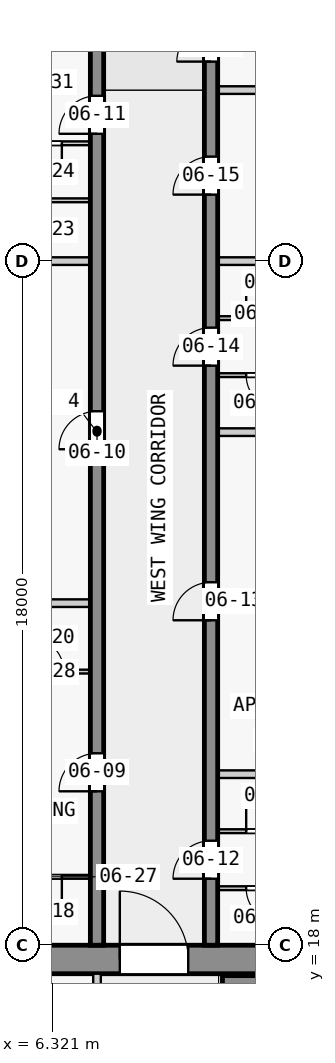
"""IFC4 building model, lengths in metres.
Left out: names, types, materials, properties, quantities, classifications, styles, units other than length and angle.
Written with IfcOpenShell. Run it as: python <this file> out.ifc"""

import sys

from ifc_helpers import new_model, si_unit, direction, frame, frame_2d, origin, place, context, subcontext, project, spatial, rectangle, extrude, element, fill, save


model = new_model("IFC4")
c1 = context("Model", 3, precision=1e-05, world=origin(), true_north=direction((0.0, 1.0)))
c2 = subcontext(c1, "Body", "Model", "MODEL_VIEW")
j1 = project(units=[si_unit("LENGTHUNIT", "METRE"), si_unit("PLANEANGLEUNIT", "RADIAN")], contexts=[c1])
p1 = place(None, origin())
s1 = spatial("IfcSite", under=j1, at=p1, CompositionType="ELEMENT")
p2 = place(p1, origin())
s2 = spatial("IfcBuilding", under=s1, at=p2, CompositionType="ELEMENT")
p3 = place(p2, frame((0.0, 0.0, 30.3)))
s3 = spatial("IfcBuildingStorey", under=s2, at=p3, CompositionType="ELEMENT", Elevation=30.3)
p4 = place(p3, frame((1.55, 17.625, 0.0), z_axis=(0.0, 0.0, 1.0), x_axis=(1.0, 0.0, 0.0)))
e1 = element("IfcWall", 1, at=p4, inside=s3, PredefinedType="SHEAR", context=c2, shape_type="SweptSolid", body=[
    extrude(rectangle(XDim=20.95, YDim=0.75, at=frame_2d((10.475, 0.0))), origin(), (0.0, 0.0, 1.0), 3.25),
])
p5 = place(p4, frame((6.55, 0.0, 0.0)))
e2 = element("IfcOpeningElement", 2, at=p5, cuts=e1, PredefinedType="OPENING", context=c2, shape_type="SweptSolid", body=[
    extrude(rectangle(XDim=1.8, YDim=2.1, at=frame_2d((0.9, 1.05))), frame((0.0, 0.385, 0.0), z_axis=(0.0, -1.0, 0.0), x_axis=(1.0, 0.0, 0.0)), (0.0, 0.0, 1.0), 0.77),
])
p6 = place(p3, frame((10.8, 17.05, 0.0), z_axis=(0.0, 0.0, 1.0), x_axis=(1.0, 0.0, 0.0)))
e3 = element("IfcWall", 3, at=p6, inside=s3, PredefinedType="SHEAR", context=c2, shape_type="SweptSolid", body=[
    extrude(rectangle(XDim=7.8, YDim=0.3, at=frame_2d((3.9, 0.0))), origin(), (0.0, 0.0, 1.0), 3.25),
])
p7 = place(p3, frame((7.5, 18.0, 0.0), z_axis=(0.0, 0.0, 1.0), x_axis=(0.0, 1.0, 0.0)))
e4 = element("IfcWall", 4, at=p7, inside=s3, PredefinedType="SHEAR", context=c2, shape_type="SweptSolid", body=[
    extrude(rectangle(XDim=27.0, YDim=0.35, at=frame_2d((13.5, 0.0))), origin(), (0.0, 0.0, 1.0), 3.25),
])
p8 = place(p7, frame((4.05, 0.0, 0.0)))
e5 = element("IfcOpeningElement", 5, at=p8, cuts=e4, PredefinedType="OPENING", context=c2, shape_type="SweptSolid", body=[
    extrude(rectangle(XDim=1.0, YDim=2.1, at=frame_2d((0.5, 1.05))), frame((0.0, 0.185, 0.0), z_axis=(0.0, -1.0, 0.0), x_axis=(1.0, 0.0, 0.0)), (0.0, 0.0, 1.0), 0.37),
])
p9 = place(p7, frame((13.05, 0.0, 0.0)))
e6 = element("IfcOpeningElement", 6, at=p9, cuts=e4, PredefinedType="OPENING", context=c2, shape_type="SweptSolid", body=[
    extrude(rectangle(XDim=1.0, YDim=2.1, at=frame_2d((0.5, 1.05))), frame((0.0, 0.185, 0.0), z_axis=(0.0, -1.0, 0.0), x_axis=(1.0, 0.0, 0.0)), (0.0, 0.0, 1.0), 0.37),
])
p10 = place(p7, frame((21.35, 0.0, 0.0)))
e7 = element("IfcOpeningElement", 7, at=p10, cuts=e4, PredefinedType="OPENING", context=c2, shape_type="SweptSolid", body=[
    extrude(rectangle(XDim=1.0, YDim=2.1, at=frame_2d((0.5, 1.05))), frame((0.0, 0.185, 0.0), z_axis=(0.0, -1.0, 0.0), x_axis=(1.0, 0.0, 0.0)), (0.0, 0.0, 1.0), 0.37),
])
p11 = place(p3, frame((10.5, 18.0, 0.0), z_axis=(0.0, 0.0, 1.0), x_axis=(0.0, 1.0, 0.0)))
e8 = element("IfcWall", 8, at=p11, inside=s3, PredefinedType="SHEAR", context=c2, shape_type="SweptSolid", body=[
    extrude(rectangle(XDim=27.0, YDim=0.35, at=frame_2d((13.5, 0.0))), origin(), (0.0, 0.0, 1.0), 3.25),
])
p12 = place(p11, frame((1.75, 0.0, 0.0)))
e9 = element("IfcOpeningElement", 9, at=p12, cuts=e8, PredefinedType="OPENING", context=c2, shape_type="SweptSolid", body=[
    extrude(rectangle(XDim=1.0, YDim=2.1, at=frame_2d((0.5, 1.05))), frame((0.0, 0.185, 0.0), z_axis=(0.0, -1.0, 0.0), x_axis=(1.0, 0.0, 0.0)), (0.0, 0.0, 1.0), 0.37),
])
p13 = place(p11, frame((8.55, 0.0, 0.0)))
e10 = element("IfcOpeningElement", 10, at=p13, cuts=e8, PredefinedType="OPENING", context=c2, shape_type="SweptSolid", body=[
    extrude(rectangle(XDim=1.0, YDim=2.1, at=frame_2d((0.5, 1.05))), frame((0.0, 0.185, 0.0), z_axis=(0.0, -1.0, 0.0), x_axis=(1.0, 0.0, 0.0)), (0.0, 0.0, 1.0), 0.37),
])
p14 = place(p11, frame((15.25, 0.0, 0.0)))
e11 = element("IfcOpeningElement", 11, at=p14, cuts=e8, PredefinedType="OPENING", context=c2, shape_type="SweptSolid", body=[
    extrude(rectangle(XDim=1.0, YDim=2.1, at=frame_2d((0.5, 1.05))), frame((0.0, 0.185, 0.0), z_axis=(0.0, -1.0, 0.0), x_axis=(1.0, 0.0, 0.0)), (0.0, 0.0, 1.0), 0.37),
])
p15 = place(p11, frame((19.75, 0.0, 0.0)))
e12 = element("IfcOpeningElement", 12, at=p15, cuts=e8, PredefinedType="OPENING", context=c2, shape_type="SweptSolid", body=[
    extrude(rectangle(XDim=1.0, YDim=2.1, at=frame_2d((0.5, 1.05))), frame((0.0, 0.185, 0.0), z_axis=(0.0, -1.0, 0.0), x_axis=(1.0, 0.0, 0.0)), (0.0, 0.0, 1.0), 0.37),
])
p16 = place(p11, frame((23.25, 0.0, 0.0)))
e13 = element("IfcOpeningElement", 13, at=p16, cuts=e8, PredefinedType="OPENING", context=c2, shape_type="SweptSolid", body=[
    extrude(rectangle(XDim=0.9, YDim=2.1, at=frame_2d((0.45, 1.05))), frame((0.0, 0.185, 0.0), z_axis=(0.0, -1.0, 0.0), x_axis=(1.0, 0.0, 0.0)), (0.0, 0.0, 1.0), 0.37),
])
p17 = place(p11, frame((25.45, 0.0, 0.0)))
e14 = element("IfcOpeningElement", 14, at=p17, cuts=e8, PredefinedType="OPENING", context=c2, shape_type="SweptSolid", body=[
    extrude(rectangle(XDim=1.0, YDim=2.1, at=frame_2d((0.5, 1.05))), frame((0.0, 0.185, 0.0), z_axis=(0.0, -1.0, 0.0), x_axis=(1.0, 0.0, 0.0)), (0.0, 0.0, 1.0), 0.37),
])
p18 = place(p3, frame((7.5, 10.1, 0.0), z_axis=(0.0, 0.0, 1.0), x_axis=(0.0, 1.0, 0.0)))
e15 = element("IfcWall", 15, at=p18, inside=s3, PredefinedType="PARTITIONING", context=c2, shape_type="SweptSolid", body=[
    extrude(rectangle(XDim=7.15, YDim=0.2, at=frame_2d((3.575, 0.0))), origin(), (0.0, 0.0, 1.0), 3.25),
])
p19 = place(p18, frame((1.05, 0.0, 0.0)))
e16 = element("IfcOpeningElement", 16, at=p19, cuts=e15, PredefinedType="OPENING", context=c2, shape_type="SweptSolid", body=[
    extrude(rectangle(XDim=0.9, YDim=2.1, at=frame_2d((0.45, 1.05))), frame((0.0, 0.11, 0.0), z_axis=(0.0, -1.0, 0.0), x_axis=(1.0, 0.0, 0.0)), (0.0, 0.0, 1.0), 0.22),
])
p20 = place(p18, frame((4.625, 0.0, 0.0)))
e17 = element("IfcOpeningElement", 17, at=p20, cuts=e15, PredefinedType="OPENING", context=c2, shape_type="SweptSolid", body=[
    extrude(rectangle(XDim=0.9, YDim=2.1, at=frame_2d((0.45, 1.05))), frame((0.0, 0.11, 0.0), z_axis=(0.0, -1.0, 0.0), x_axis=(1.0, 0.0, 0.0)), (0.0, 0.0, 1.0), 0.22),
])
p21 = place(p3, frame((13.075, 19.5, 0.0), z_axis=(0.0, 0.0, 1.0), x_axis=(-1.0, 0.0, 0.0)))
e18 = element("IfcWall", 18, at=p21, inside=s3, PredefinedType="PARTITIONING", context=c2, shape_type="SweptSolid", body=[
    extrude(rectangle(XDim=2.4, YDim=0.1, at=frame_2d((1.2, 0.0))), origin(), (0.0, 0.0, 1.0), 3.25),
])
p22 = place(p21, frame((0.75, 0.0, 0.0)))
e19 = element("IfcOpeningElement", 19, at=p22, cuts=e18, PredefinedType="OPENING", context=c2, shape_type="SweptSolid", body=[
    extrude(rectangle(XDim=0.9, YDim=2.1, at=frame_2d((0.45, 1.05))), frame((0.0, 0.06, 0.0), z_axis=(0.0, -1.0, 0.0), x_axis=(1.0, 0.0, 0.0)), (0.0, 0.0, 1.0), 0.12),
])
p23 = place(p3, frame((7.325, 19.8, 0.0), z_axis=(0.0, 0.0, 1.0), x_axis=(-1.0, 0.0, 0.0)))
e20 = element("IfcWall", 20, at=p23, inside=s3, PredefinedType="PARTITIONING", context=c2, shape_type="SweptSolid", body=[
    extrude(rectangle(XDim=2.4, YDim=0.1, at=frame_2d((1.2, 0.0))), origin(), (0.0, 0.0, 1.0), 3.25),
])
p24 = place(p23, frame((0.75, 0.0, 0.0)))
e21 = element("IfcOpeningElement", 21, at=p24, cuts=e20, PredefinedType="OPENING", context=c2, shape_type="SweptSolid", body=[
    extrude(rectangle(XDim=0.9, YDim=2.1, at=frame_2d((0.45, 1.05))), frame((0.0, 0.06, 0.0), z_axis=(0.0, -1.0, 0.0), x_axis=(1.0, 0.0, 0.0)), (0.0, 0.0, 1.0), 0.12),
])
p25 = place(p3, frame((10.675, 21.0, 0.0), z_axis=(0.0, 0.0, 1.0), x_axis=(1.0, 0.0, 0.0)))
e22 = element("IfcWall", 22, at=p25, inside=s3, PredefinedType="PARTITIONING", context=c2, shape_type="SweptSolid", body=[
    extrude(rectangle(XDim=2.4, YDim=0.1, at=frame_2d((1.2, 0.0))), origin(), (0.0, 0.0, 1.0), 3.25),
])
p26 = place(p25, frame((0.75, 0.0, 0.0)))
e23 = element("IfcOpeningElement", 23, at=p26, cuts=e22, PredefinedType="OPENING", context=c2, shape_type="SweptSolid", body=[
    extrude(rectangle(XDim=0.9, YDim=2.1, at=frame_2d((0.45, 1.05))), frame((0.0, 0.06, 0.0), z_axis=(0.0, -1.0, 0.0), x_axis=(1.0, 0.0, 0.0)), (0.0, 0.0, 1.0), 0.12),
])
p27 = place(p3, frame((12.975, 22.5, 0.0), z_axis=(0.0, 0.0, 1.0), x_axis=(-1.0, 0.0, 0.0)))
e24 = element("IfcWall", 24, at=p27, inside=s3, PredefinedType="PARTITIONING", context=c2, shape_type="SweptSolid", body=[
    extrude(rectangle(XDim=2.3, YDim=0.2, at=frame_2d((1.15, 0.0))), origin(), (0.0, 0.0, 1.0), 3.25),
])
p28 = place(p3, frame((4.975, 25.2, 0.0), z_axis=(0.0, 0.0, 1.0), x_axis=(1.0, 0.0, 0.0)))
e25 = element("IfcWall", 25, at=p28, inside=s3, PredefinedType="PARTITIONING", context=c2, shape_type="SweptSolid", body=[
    extrude(rectangle(XDim=2.35, YDim=0.1, at=frame_2d((1.175, 0.0))), origin(), (0.0, 0.0, 1.0), 3.25),
])
p29 = place(p28, frame((0.75, 0.0, 0.0)))
e26 = element("IfcOpeningElement", 26, at=p29, cuts=e25, PredefinedType="OPENING", context=c2, shape_type="SweptSolid", body=[
    extrude(rectangle(XDim=0.9, YDim=2.1, at=frame_2d((0.45, 1.05))), frame((0.0, 0.06, 0.0), z_axis=(0.0, -1.0, 0.0), x_axis=(1.0, 0.0, 0.0)), (0.0, 0.0, 1.0), 0.12),
])
for number, where, z_axis, x_axis in (
    (27, (7.325, 27.0, 0.0), (0.0, 0.0, 1.0), (-1.0, 0.0, 0.0)),
    (28, (17.85, 31.5, 0.0), (0.0, 0.0, 1.0), (-1.0, 0.0, 0.0)),
):
    element("IfcWall", number, at=place(p3, frame(where, z_axis=z_axis, x_axis=x_axis)), inside=s3, PredefinedType="PARTITIONING", context=c2, shape_type="SweptSolid", body=[
        extrude(rectangle(XDim=7.175, YDim=0.2, at=frame_2d((3.587, 0.0))), origin(), (0.0, 0.0, 1.0), 3.25),
    ])
p30 = place(p3, frame((13.075, 33.0, 0.0), z_axis=(0.0, 0.0, 1.0), x_axis=(-1.0, 0.0, 0.0)))
e29 = element("IfcWall", 29, at=p30, inside=s3, PredefinedType="PARTITIONING", context=c2, shape_type="SweptSolid", body=[
    extrude(rectangle(XDim=2.4, YDim=0.1, at=frame_2d((1.2, 0.0))), origin(), (0.0, 0.0, 1.0), 3.25),
])
p31 = place(p30, frame((0.75, 0.0, 0.0)))
e30 = element("IfcOpeningElement", 30, at=p31, cuts=e29, PredefinedType="OPENING", context=c2, shape_type="SweptSolid", body=[
    extrude(rectangle(XDim=0.9, YDim=2.1, at=frame_2d((0.45, 1.05))), frame((0.0, 0.06, 0.0), z_axis=(0.0, -1.0, 0.0), x_axis=(1.0, 0.0, 0.0)), (0.0, 0.0, 1.0), 0.12),
])
p32 = place(p3, frame((10.675, 34.5, 0.0), z_axis=(0.0, 0.0, 1.0), x_axis=(1.0, 0.0, 0.0)))
e31 = element("IfcWall", 31, at=p32, inside=s3, PredefinedType="PARTITIONING", context=c2, shape_type="SweptSolid", body=[
    extrude(rectangle(XDim=2.4, YDim=0.1, at=frame_2d((1.2, 0.0))), origin(), (0.0, 0.0, 1.0), 3.25),
])
p33 = place(p32, frame((0.75, 0.0, 0.0)))
e32 = element("IfcOpeningElement", 32, at=p33, cuts=e31, PredefinedType="OPENING", context=c2, shape_type="SweptSolid", body=[
    extrude(rectangle(XDim=0.9, YDim=2.1, at=frame_2d((0.45, 1.05))), frame((0.0, 0.06, 0.0), z_axis=(0.0, -1.0, 0.0), x_axis=(1.0, 0.0, 0.0)), (0.0, 0.0, 1.0), 0.12),
])
p34 = place(p3, frame((7.325, 36.0, 0.0), z_axis=(0.0, 0.0, 1.0), x_axis=(-1.0, 0.0, 0.0)))
e33 = element("IfcWall", 33, at=p34, inside=s3, PredefinedType="PARTITIONING", context=c2, shape_type="SweptSolid", body=[
    extrude(rectangle(XDim=5.925, YDim=0.2, at=frame_2d((2.962, 0.0))), origin(), (0.0, 0.0, 1.0), 3.25),
])
p35 = place(p3, frame((12.975, 36.0, 0.0), z_axis=(0.0, 0.0, 1.0), x_axis=(-1.0, 0.0, 0.0)))
e34 = element("IfcWall", 34, at=p35, inside=s3, PredefinedType="PARTITIONING", context=c2, shape_type="SweptSolid", body=[
    extrude(rectangle(XDim=2.3, YDim=0.2, at=frame_2d((1.15, 0.0))), origin(), (0.0, 0.0, 1.0), 3.25),
])
p36 = place(p3, frame((7.325, 37.6, 0.0), z_axis=(0.0, 0.0, 1.0), x_axis=(-1.0, 0.0, 0.0)))
e35 = element("IfcWall", 35, at=p36, inside=s3, PredefinedType="PARTITIONING", context=c2, shape_type="SweptSolid", body=[
    extrude(rectangle(XDim=2.35, YDim=0.1, at=frame_2d((1.175, 0.0))), origin(), (0.0, 0.0, 1.0), 3.25),
])
p37 = place(p3, frame((7.325, 39.1, 0.0), z_axis=(0.0, 0.0, 1.0), x_axis=(-1.0, 0.0, 0.0)))
e36 = element("IfcWall", 36, at=p37, inside=s3, PredefinedType="PARTITIONING", context=c2, shape_type="SweptSolid", body=[
    extrude(rectangle(XDim=2.35, YDim=0.1, at=frame_2d((1.175, 0.0))), origin(), (0.0, 0.0, 1.0), 3.25),
])
p38 = place(p37, frame((0.75, 0.0, 0.0)))
e37 = element("IfcOpeningElement", 37, at=p38, cuts=e36, PredefinedType="OPENING", context=c2, shape_type="SweptSolid", body=[
    extrude(rectangle(XDim=0.9, YDim=2.1, at=frame_2d((0.45, 1.05))), frame((0.0, 0.06, 0.0), z_axis=(0.0, -1.0, 0.0), x_axis=(1.0, 0.0, 0.0)), (0.0, 0.0, 1.0), 0.12),
])
p39 = place(p3, frame((18.08, 40.5, 0.0), z_axis=(0.0, 0.0, 1.0), x_axis=(-1.0, 0.0, 0.0)))
e38 = element("IfcWall", 38, at=p39, inside=s3, PredefinedType="PARTITIONING", context=c2, shape_type="SweptSolid", body=[
    extrude(rectangle(XDim=7.405, YDim=0.2, at=frame_2d((3.703, 0.0))), origin(), (0.0, 0.0, 1.0), 3.25),
])
p40 = place(p5, origin())
e39 = element("IfcDoor", 39, at=p40, inside=s3, OperationType="DOUBLE_DOOR_SINGLE_SWING", PredefinedType="DOOR", context=c2, shape_type="SweptSolid", body=[
    extrude(rectangle(XDim=1.8, YDim=2.1, at=frame_2d((0.9, 1.05))), frame((0.0, 0.025, 0.0), z_axis=(0.0, -1.0, 0.0), x_axis=(1.0, 0.0, 0.0)), (0.0, 0.0, 1.0), 0.05),
])
fill(e2, e39)
p41 = place(p8, origin())
e40 = element("IfcDoor", 40, at=p41, inside=s3, OperationType="SINGLE_SWING_LEFT", PredefinedType="DOOR", context=c2, shape_type="SweptSolid", body=[
    extrude(rectangle(XDim=1.0, YDim=2.1, at=frame_2d((0.5, 1.05))), frame((0.0, 0.025, 0.0), z_axis=(0.0, -1.0, 0.0), x_axis=(1.0, 0.0, 0.0)), (0.0, 0.0, 1.0), 0.05),
])
fill(e5, e40)
p42 = place(p9, origin())
e41 = element("IfcDoor", 41, at=p42, inside=s3, OperationType="SINGLE_SWING_RIGHT", PredefinedType="DOOR", context=c2, shape_type="SweptSolid", body=[
    extrude(rectangle(XDim=1.0, YDim=2.1, at=frame_2d((0.5, 1.05))), frame((0.0, 0.025, 0.0), z_axis=(0.0, -1.0, 0.0), x_axis=(1.0, 0.0, 0.0)), (0.0, 0.0, 1.0), 0.05),
])
fill(e6, e41)
p43 = place(p10, origin())
e42 = element("IfcDoor", 42, at=p43, inside=s3, OperationType="SINGLE_SWING_RIGHT", PredefinedType="DOOR", context=c2, shape_type="SweptSolid", body=[
    extrude(rectangle(XDim=1.0, YDim=2.1, at=frame_2d((0.5, 1.05))), frame((0.0, 0.025, 0.0), z_axis=(0.0, -1.0, 0.0), x_axis=(1.0, 0.0, 0.0)), (0.0, 0.0, 1.0), 0.05),
])
fill(e7, e42)
p44 = place(p12, origin())
e43 = element("IfcDoor", 43, at=p44, inside=s3, OperationType="SINGLE_SWING_LEFT", PredefinedType="DOOR", context=c2, shape_type="SweptSolid", body=[
    extrude(rectangle(XDim=1.0, YDim=2.1, at=frame_2d((0.5, 1.05))), frame((0.0, 0.025, 0.0), z_axis=(0.0, -1.0, 0.0), x_axis=(1.0, 0.0, 0.0)), (0.0, 0.0, 1.0), 0.05),
])
fill(e9, e43)
p45 = place(p13, origin())
e44 = element("IfcDoor", 44, at=p45, inside=s3, OperationType="SINGLE_SWING_LEFT", PredefinedType="DOOR", context=c2, shape_type="SweptSolid", body=[
    extrude(rectangle(XDim=1.0, YDim=2.1, at=frame_2d((0.5, 1.05))), frame((0.0, 0.025, 0.0), z_axis=(0.0, -1.0, 0.0), x_axis=(1.0, 0.0, 0.0)), (0.0, 0.0, 1.0), 0.05),
])
fill(e10, e44)
p46 = place(p14, origin())
e45 = element("IfcDoor", 45, at=p46, inside=s3, OperationType="SINGLE_SWING_RIGHT", PredefinedType="DOOR", context=c2, shape_type="SweptSolid", body=[
    extrude(rectangle(XDim=1.0, YDim=2.1, at=frame_2d((0.5, 1.05))), frame((0.0, 0.025, 0.0), z_axis=(0.0, -1.0, 0.0), x_axis=(1.0, 0.0, 0.0)), (0.0, 0.0, 1.0), 0.05),
])
fill(e11, e45)
p47 = place(p15, origin())
e46 = element("IfcDoor", 46, at=p47, inside=s3, OperationType="SINGLE_SWING_RIGHT", PredefinedType="DOOR", context=c2, shape_type="SweptSolid", body=[
    extrude(rectangle(XDim=1.0, YDim=2.1, at=frame_2d((0.5, 1.05))), frame((0.0, 0.025, 0.0), z_axis=(0.0, -1.0, 0.0), x_axis=(1.0, 0.0, 0.0)), (0.0, 0.0, 1.0), 0.05),
])
fill(e12, e46)
p48 = place(p16, origin())
e47 = element("IfcDoor", 47, at=p48, inside=s3, OperationType="SINGLE_SWING_RIGHT", PredefinedType="DOOR", context=c2, shape_type="SweptSolid", body=[
    extrude(rectangle(XDim=0.9, YDim=2.1, at=frame_2d((0.45, 1.05))), frame((0.0, 0.025, 0.0), z_axis=(0.0, -1.0, 0.0), x_axis=(1.0, 0.0, 0.0)), (0.0, 0.0, 1.0), 0.05),
])
fill(e13, e47)
p49 = place(p24, origin())
e48 = element("IfcDoor", 48, at=p49, inside=s3, OperationType="SINGLE_SWING_LEFT", PredefinedType="DOOR", context=c2, shape_type="SweptSolid", body=[
    extrude(rectangle(XDim=0.9, YDim=2.1, at=frame_2d((0.45, 1.05))), frame((0.0, 0.025, 0.0), z_axis=(0.0, -1.0, 0.0), x_axis=(1.0, 0.0, 0.0)), (0.0, 0.0, 1.0), 0.05),
])
fill(e21, e48)
p50 = place(p29, origin())
e49 = element("IfcDoor", 49, at=p50, inside=s3, OperationType="SINGLE_SWING_RIGHT", PredefinedType="DOOR", context=c2, shape_type="SweptSolid", body=[
    extrude(rectangle(XDim=0.9, YDim=2.1, at=frame_2d((0.45, 1.05))), frame((0.0, 0.025, 0.0), z_axis=(0.0, -1.0, 0.0), x_axis=(1.0, 0.0, 0.0)), (0.0, 0.0, 1.0), 0.05),
])
fill(e26, e49)
p51 = place(p38, origin())
e50 = element("IfcDoor", 50, at=p51, inside=s3, OperationType="SINGLE_SWING_RIGHT", PredefinedType="DOOR", context=c2, shape_type="SweptSolid", body=[
    extrude(rectangle(XDim=0.9, YDim=2.1, at=frame_2d((0.45, 1.05))), frame((0.0, 0.025, 0.0), z_axis=(0.0, -1.0, 0.0), x_axis=(1.0, 0.0, 0.0)), (0.0, 0.0, 1.0), 0.05),
])
fill(e37, e50)
p52 = place(p22, origin())
e51 = element("IfcDoor", 51, at=p52, inside=s3, OperationType="SINGLE_SWING_RIGHT", PredefinedType="DOOR", context=c2, shape_type="SweptSolid", body=[
    extrude(rectangle(XDim=0.9, YDim=2.1, at=frame_2d((0.45, 1.05))), frame((0.0, 0.025, 0.0), z_axis=(0.0, -1.0, 0.0), x_axis=(1.0, 0.0, 0.0)), (0.0, 0.0, 1.0), 0.05),
])
fill(e19, e51)
p53 = place(p26, origin())
e52 = element("IfcDoor", 52, at=p53, inside=s3, OperationType="SINGLE_SWING_RIGHT", PredefinedType="DOOR", context=c2, shape_type="SweptSolid", body=[
    extrude(rectangle(XDim=0.9, YDim=2.1, at=frame_2d((0.45, 1.05))), frame((0.0, 0.025, 0.0), z_axis=(0.0, -1.0, 0.0), x_axis=(1.0, 0.0, 0.0)), (0.0, 0.0, 1.0), 0.05),
])
fill(e23, e52)
p54 = place(p31, origin())
e53 = element("IfcDoor", 53, at=p54, inside=s3, OperationType="SINGLE_SWING_RIGHT", PredefinedType="DOOR", context=c2, shape_type="SweptSolid", body=[
    extrude(rectangle(XDim=0.9, YDim=2.1, at=frame_2d((0.45, 1.05))), frame((0.0, 0.025, 0.0), z_axis=(0.0, -1.0, 0.0), x_axis=(1.0, 0.0, 0.0)), (0.0, 0.0, 1.0), 0.05),
])
fill(e30, e53)
p55 = place(p33, origin())
e54 = element("IfcDoor", 54, at=p55, inside=s3, OperationType="SINGLE_SWING_RIGHT", PredefinedType="DOOR", context=c2, shape_type="SweptSolid", body=[
    extrude(rectangle(XDim=0.9, YDim=2.1, at=frame_2d((0.45, 1.05))), frame((0.0, 0.025, 0.0), z_axis=(0.0, -1.0, 0.0), x_axis=(1.0, 0.0, 0.0)), (0.0, 0.0, 1.0), 0.05),
])
fill(e32, e54)
save(model, sys.argv[1])
